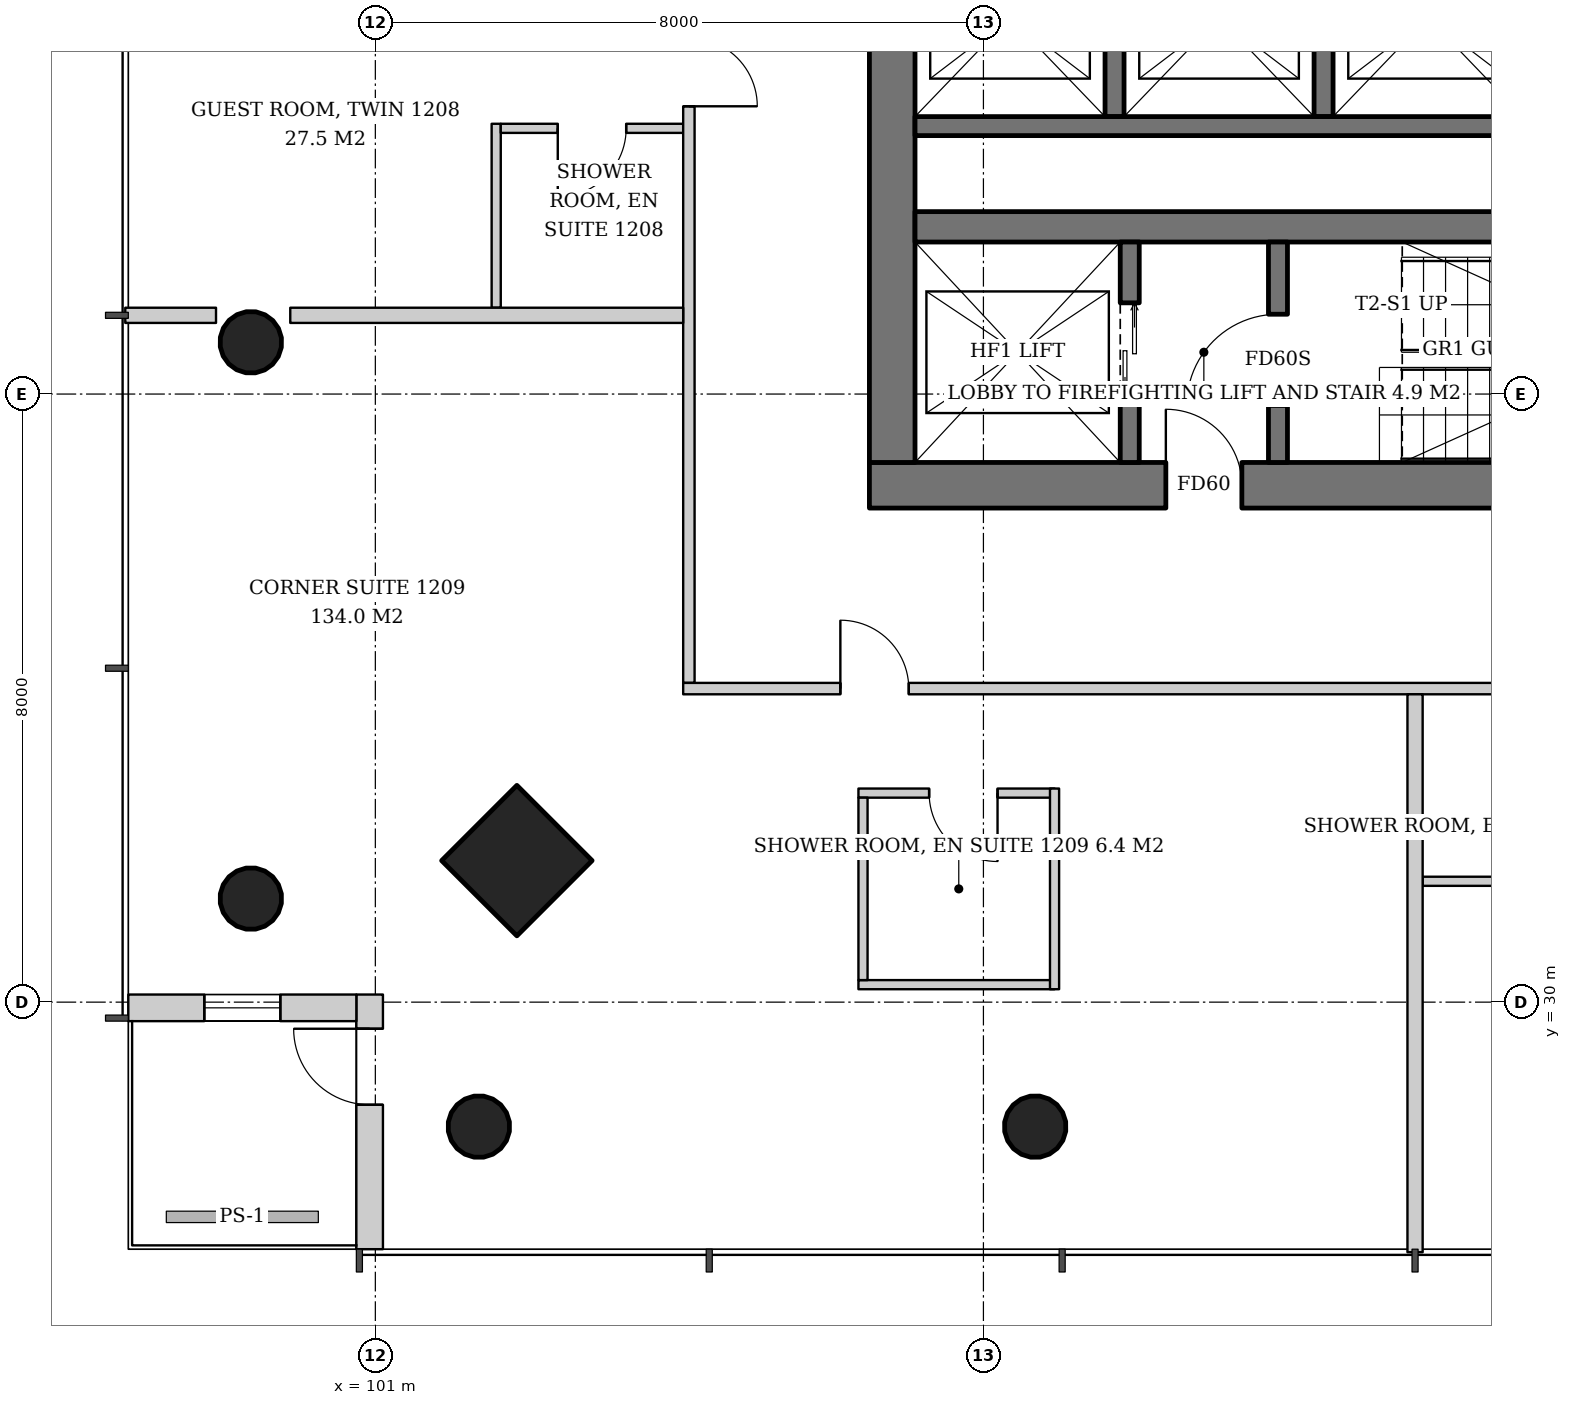
"""IFC4 building model, lengths in metres.
Left out: names, types, materials, properties, quantities, classifications, styles, units other than length and angle.
Written with IfcOpenShell. Run it as: python <this file> out.ifc"""

import sys

from ifc_helpers import new_model, si_unit, direction, frame, frame_2d, origin, origin_2d, place, context, subcontext, project, spatial, rectangle, hollow_circle, extrude, element, fill, save


model = new_model("IFC4")
c1 = context("Model", 3, precision=1e-05, world=origin(), true_north=direction((0.0, 1.0)))
c2 = subcontext(c1, "Body", "Model", "MODEL_VIEW")
j1 = project(units=[si_unit("LENGTHUNIT", "METRE"), si_unit("PLANEANGLEUNIT", "RADIAN")], contexts=[c1])
p1 = place(None, origin())
s1 = spatial("IfcSite", under=j1, at=p1, CompositionType="ELEMENT")
p2 = place(p1, origin())
s2 = spatial("IfcBuilding", under=s1, at=p2, CompositionType="ELEMENT")
p3 = place(p2, frame((0.0, 0.0, 51.4)))
s3 = spatial("IfcBuildingStorey", under=s2, at=p3, CompositionType="ELEMENT", Elevation=51.4)
p4 = place(p3, frame((102.81, 31.81, 0.0), z_axis=(0.043029647111, 0.043029647111, 0.998146732169), x_axis=(-0.707106781187, 0.707106781187, 0.0)))
e1 = element("IfcColumn", 1, at=p4, inside=s3, PredefinedType="COLUMN", context=c2, shape_type="SweptSolid", body=[
    extrude(rectangle(XDim=1.4, YDim=1.4, at=origin_2d()), origin(), (0.0, 0.0, 1.0), 3.807),
])
p5 = place(p3, frame((99.31, 31.31, 0.0), z_axis=(0.043029647111, 0.043029647111, 0.998146732169), x_axis=(-0.707106781187, 0.707106781187, 0.0)))
e2 = element("IfcColumn", 2, at=p5, inside=s3, PredefinedType="COLUMN", context=c2, shape_type="SweptSolid", body=[
    extrude(hollow_circle(Radius=0.406, WallThickness=0.03, at=origin_2d()), origin(), (0.0, 0.0, 1.0), 3.807),
])
p6 = place(p3, frame((99.31, 38.655, 0.0), z_axis=(0.043059584825, 0.021497706284, 0.998841188968), x_axis=(-0.446680166538, 0.894693706707, 0.0)))
e3 = element("IfcColumn", 3, at=p6, inside=s3, PredefinedType="COLUMN", context=c2, shape_type="SweptSolid", body=[
    extrude(hollow_circle(Radius=0.406, WallThickness=0.03, at=origin_2d()), origin(), (0.0, 0.0, 1.0), 3.804),
])
p7 = place(p3, frame((102.31, 28.31, 0.0), z_axis=(0.043029647111, 0.043029647111, 0.998146732169), x_axis=(-0.707106781187, 0.707106781187, 0.0)))
e4 = element("IfcColumn", 4, at=p7, inside=s3, PredefinedType="COLUMN", context=c2, shape_type="SweptSolid", body=[
    extrude(hollow_circle(Radius=0.406, WallThickness=0.03, at=origin_2d()), origin(), (0.0, 0.0, 1.0), 3.807),
])
p8 = place(p3, frame((109.655, 28.31, 0.0), z_axis=(0.021497706284, 0.043059584825, 0.998841188968), x_axis=(-0.894693706707, 0.446680166538, 0.0)))
e5 = element("IfcColumn", 5, at=p8, inside=s3, PredefinedType="COLUMN", context=c2, shape_type="SweptSolid", body=[
    extrude(hollow_circle(Radius=0.406, WallThickness=0.03, at=origin_2d()), origin(), (0.0, 0.0, 1.0), 3.804),
])
p9 = place(p3, frame((107.5, 36.8, 0.0), z_axis=(0.0, 0.0, 1.0), x_axis=(1.0, 0.0, 0.0)))
e6 = element("IfcWall", 6, at=p9, inside=s3, PredefinedType="SHEAR", context=c2, shape_type="SweptSolid", body=[
    extrude(rectangle(XDim=19.0, YDim=0.6, at=frame_2d((9.5, 0.0))), origin(), (0.0, 0.0, 1.0), 3.8),
])
p10 = place(p9, frame((3.9, 0.0, 0.0)))
e7 = element("IfcOpeningElement", 7, at=p10, cuts=e6, PredefinedType="OPENING", context=c2, shape_type="SweptSolid", body=[
    extrude(rectangle(XDim=1.0, YDim=2.1, at=frame_2d((0.5, 1.05))), frame((0.0, 0.31, 0.0), z_axis=(0.0, -1.0, 0.0), x_axis=(1.0, 0.0, 0.0)), (0.0, 0.0, 1.0), 0.62),
])
p11 = place(p9, frame((14.335, 0.0, 0.0)))
e8 = element("IfcOpeningElement", 8, at=p11, cuts=e6, PredefinedType="OPENING", context=c2, shape_type="SweptSolid", body=[
    extrude(rectangle(XDim=1.0, YDim=2.1, at=frame_2d((0.5, 1.05))), frame((0.0, 0.31, 0.0), z_axis=(0.0, -1.0, 0.0), x_axis=(1.0, 0.0, 0.0)), (0.0, 0.0, 1.0), 0.62),
])
p12 = place(p9, frame((16.2, 0.0, 0.0)))
e9 = element("IfcOpeningElement", 9, at=p12, cuts=e6, PredefinedType="OPENING", context=c2, shape_type="SweptSolid", body=[
    extrude(rectangle(XDim=1.0, YDim=2.1, at=frame_2d((0.5, 1.05))), frame((0.0, 0.31, 0.0), z_axis=(0.0, -1.0, 0.0), x_axis=(1.0, 0.0, 0.0)), (0.0, 0.0, 1.0), 0.62),
])
p13 = place(p3, frame((107.8, 37.1, 0.0), z_axis=(0.0, 0.0, 1.0), x_axis=(0.0, 1.0, 0.0)))
e10 = element("IfcWall", 10, at=p13, inside=s3, PredefinedType="SHEAR", context=c2, shape_type="SweptSolid", body=[
    extrude(rectangle(XDim=17.8, YDim=0.6, at=frame_2d((8.9, 0.0))), origin(), (0.0, 0.0, 1.0), 3.8),
])
p14 = place(p13, frame((8.0, 0.0, 0.0)))
e11 = element("IfcOpeningElement", 11, at=p14, cuts=e10, PredefinedType="OPENING", context=c2, shape_type="SweptSolid", body=[
    extrude(rectangle(XDim=1.8, YDim=2.4, at=frame_2d((0.9, 1.2))), frame((0.0, 0.31, 0.0), z_axis=(0.0, -1.0, 0.0), x_axis=(1.0, 0.0, 0.0)), (0.0, 0.0, 1.0), 0.62),
])
p15 = place(p3, frame((108.1, 40.2, 0.0), z_axis=(0.0, 0.0, 1.0), x_axis=(1.0, 0.0, 0.0)))
e12 = element("IfcWall", 12, at=p15, inside=s3, PredefinedType="SHEAR", context=c2, shape_type="SweptSolid", body=[
    extrude(rectangle(XDim=17.8, YDim=0.4, at=frame_2d((8.9, 0.0))), origin(), (0.0, 0.0, 1.0), 3.8),
])
p16 = place(p3, frame((100.925, 26.75, 0.0), z_axis=(0.0, 0.0, 1.0), x_axis=(0.0, 1.0, 0.0)))
e13 = element("IfcWall", 13, at=p16, inside=s3, PredefinedType="SOLIDWALL", context=c2, shape_type="SweptSolid", body=[
    extrude(rectangle(XDim=3.35, YDim=0.35, at=frame_2d((1.675, 0.0))), origin(), (0.0, 0.0, 1.0), 3.6),
])
p17 = place(p16, frame((1.9, 0.0, 0.0)))
e14 = element("IfcOpeningElement", 14, at=p17, cuts=e13, PredefinedType="OPENING", context=c2, shape_type="SweptSolid", body=[
    extrude(rectangle(XDim=1.0, YDim=2.4, at=frame_2d((0.5, 1.2))), frame((0.0, 0.185, 0.0), z_axis=(0.0, -1.0, 0.0), x_axis=(1.0, 0.0, 0.0)), (0.0, 0.0, 1.0), 0.37),
])
p18 = place(p3, frame((100.75, 29.925, 0.0), z_axis=(0.0, 0.0, 1.0), x_axis=(-1.0, 0.0, 0.0)))
e15 = element("IfcWall", 15, at=p18, inside=s3, PredefinedType="SOLIDWALL", context=c2, shape_type="SweptSolid", body=[
    extrude(rectangle(XDim=3.0, YDim=0.35, at=frame_2d((1.5, 0.0))), origin(), (0.0, 0.0, 1.0), 3.6),
])
p19 = place(p18, frame((1.0, 0.0, 0.9)))
e16 = element("IfcOpeningElement", 16, at=p19, cuts=e15, PredefinedType="OPENING", context=c2, shape_type="SweptSolid", body=[
    extrude(rectangle(XDim=1.0, YDim=2.4, at=frame_2d((0.5, 1.2))), frame((0.0, 0.185, 0.0), z_axis=(0.0, -1.0, 0.0), x_axis=(1.0, 0.0, 0.0)), (0.0, 0.0, 1.0), 0.37),
])
p20 = place(p3, frame((110.925, 37.1, 0.0), z_axis=(0.0, 0.0, 1.0), x_axis=(0.0, 1.0, 0.0)))
e17 = element("IfcWall", 17, at=p20, inside=s3, PredefinedType="SHEAR", context=c2, shape_type="SweptSolid", body=[
    extrude(rectangle(XDim=2.9, YDim=0.25, at=frame_2d((1.45, 0.0))), origin(), (0.0, 0.0, 1.0), 3.8),
])
p21 = place(p20, frame((0.8, 0.0, 0.0)))
e18 = element("IfcOpeningElement", 18, at=p21, cuts=e17, PredefinedType="OPENING", context=c2, shape_type="SweptSolid", body=[
    extrude(rectangle(XDim=1.3, YDim=2.2, at=frame_2d((0.65, 1.1))), frame((0.0, 0.135, 0.0), z_axis=(0.0, -1.0, 0.0), x_axis=(1.0, 0.0, 0.0)), (0.0, 0.0, 1.0), 0.27),
])
p22 = place(p3, frame((112.875, 37.1, 0.0), z_axis=(0.0, 0.0, 1.0), x_axis=(0.0, 1.0, 0.0)))
e19 = element("IfcWall", 19, at=p22, inside=s3, PredefinedType="SHEAR", context=c2, shape_type="SweptSolid", body=[
    extrude(rectangle(XDim=2.9, YDim=0.25, at=frame_2d((1.45, 0.0))), origin(), (0.0, 0.0, 1.0), 3.8),
])
p23 = place(p22, frame((0.75, 0.0, 0.0)))
e20 = element("IfcOpeningElement", 20, at=p23, cuts=e19, PredefinedType="OPENING", context=c2, shape_type="SweptSolid", body=[
    extrude(rectangle(XDim=1.2, YDim=2.1, at=frame_2d((0.6, 1.05))), frame((0.0, 0.135, 0.0), z_axis=(0.0, -1.0, 0.0), x_axis=(1.0, 0.0, 0.0)), (0.0, 0.0, 1.0), 0.27),
])
for number, where, z_axis, x_axis in (
    (21, (110.725, 44.25, 0.0), (0.0, 0.0, 1.0), (0.0, -1.0, 0.0)),
    (22, (113.475, 44.25, 0.0), (0.0, 0.0, 1.0), (0.0, -1.0, 0.0)),
):
    element("IfcWall", number, at=place(p3, frame(where, z_axis=z_axis, x_axis=x_axis)), inside=s3, PredefinedType="SHEAR", context=c2, shape_type="SweptSolid", body=[
        extrude(rectangle(XDim=2.6, YDim=0.25, at=frame_2d((1.3, 0.0))), origin(), (0.0, 0.0, 1.0), 3.8),
    ])
p24 = place(p3, frame((108.1, 41.525, 0.0), z_axis=(0.0, 0.0, 1.0), x_axis=(1.0, 0.0, 0.0)))
e23 = element("IfcWall", 23, at=p24, inside=s3, PredefinedType="SHEAR", context=c2, shape_type="SweptSolid", body=[
    extrude(rectangle(XDim=11.0, YDim=0.25, at=frame_2d((5.5, 0.0))), origin(), (0.0, 0.0, 1.0), 3.8),
])
p25 = place(p3, frame((102.59, 41.556, 0.0), z_axis=(0.0, 0.0, 1.0), x_axis=(0.0, -1.0, 0.0)))
e24 = element("IfcWall", 24, at=p25, inside=s3, PredefinedType="PARTITIONING", context=c2, shape_type="SweptSolid", body=[
    extrude(rectangle(XDim=2.42, YDim=0.12, at=frame_2d((1.21, 0.0))), origin(), (0.0, 0.0, 1.0), 3.6),
])
p26 = place(p3, frame((105.05, 41.496, 0.0), z_axis=(0.0, 0.0, 1.0), x_axis=(-1.0, 0.0, 0.0)))
e25 = element("IfcWall", 25, at=p26, inside=s3, PredefinedType="PARTITIONING", context=c2, shape_type="SweptSolid", body=[
    extrude(rectangle(XDim=2.4, YDim=0.12, at=frame_2d((1.2, 0.0))), origin(), (0.0, 0.0, 1.0), 3.6),
])
p27 = place(p26, frame((0.75, 0.0, 0.0)))
e26 = element("IfcOpeningElement", 26, at=p27, cuts=e25, PredefinedType="OPENING", context=c2, shape_type="SweptSolid", body=[
    extrude(rectangle(XDim=0.9, YDim=2.1, at=frame_2d((0.45, 1.05))), frame((0.0, 0.07, 0.0), z_axis=(0.0, -1.0, 0.0), x_axis=(1.0, 0.0, 0.0)), (0.0, 0.0, 1.0), 0.14),
])
p28 = place(p3, frame((105.125, 57.95, 0.0), z_axis=(0.0, 0.0, 1.0), x_axis=(0.0, -1.0, 0.0)))
e27 = element("IfcWall", 27, at=p28, inside=s3, PredefinedType="PARTITIONING", context=c2, shape_type="SweptSolid", body=[
    extrude(rectangle(XDim=23.75, YDim=0.15, at=frame_2d((11.875, 0.0))), origin(), (0.0, 0.0, 1.0), 2.8),
])
p29 = place(p28, frame((2.068, 0.0, 0.0)))
e28 = element("IfcOpeningElement", 28, at=p29, cuts=e27, PredefinedType="OPENING", context=c2, shape_type="SweptSolid", body=[
    extrude(rectangle(XDim=0.9, YDim=2.1, at=frame_2d((0.45, 1.05))), frame((0.0, 0.085, 0.0), z_axis=(0.0, -1.0, 0.0), x_axis=(1.0, 0.0, 0.0)), (0.0, 0.0, 1.0), 0.17),
])
p30 = place(p28, frame((7.686, 0.0, 0.0)))
e29 = element("IfcOpeningElement", 29, at=p30, cuts=e27, PredefinedType="OPENING", context=c2, shape_type="SweptSolid", body=[
    extrude(rectangle(XDim=1.0, YDim=2.1, at=frame_2d((0.5, 1.05))), frame((0.0, 0.085, 0.0), z_axis=(0.0, -1.0, 0.0), x_axis=(1.0, 0.0, 0.0)), (0.0, 0.0, 1.0), 0.17),
])
p31 = place(p28, frame((12.379, 0.0, 0.0)))
e30 = element("IfcOpeningElement", 30, at=p31, cuts=e27, PredefinedType="OPENING", context=c2, shape_type="SweptSolid", body=[
    extrude(rectangle(XDim=0.9, YDim=2.1, at=frame_2d((0.45, 1.05))), frame((0.0, 0.085, 0.0), z_axis=(0.0, -1.0, 0.0), x_axis=(1.0, 0.0, 0.0)), (0.0, 0.0, 1.0), 0.17),
])
p32 = place(p28, frame((15.264, 0.0, 0.0)))
e31 = element("IfcOpeningElement", 31, at=p32, cuts=e27, PredefinedType="OPENING", context=c2, shape_type="SweptSolid", body=[
    extrude(rectangle(XDim=0.9, YDim=2.1, at=frame_2d((0.45, 1.05))), frame((0.0, 0.085, 0.0), z_axis=(0.0, -1.0, 0.0), x_axis=(1.0, 0.0, 0.0)), (0.0, 0.0, 1.0), 0.17),
])
p33 = place(p3, frame((105.05, 39.036, 0.0), z_axis=(0.0, 0.0, 1.0), x_axis=(-1.0, 0.0, 0.0)))
e32 = element("IfcWall", 32, at=p33, inside=s3, PredefinedType="PARTITIONING", context=c2, shape_type="SweptSolid", body=[
    extrude(rectangle(XDim=5.169, YDim=0.2, at=frame_2d((2.585, 0.0))), origin(), (0.0, 0.0, 1.0), 3.6),
])
p34 = place(p3, frame((98.904, 39.036, 0.0), z_axis=(0.0, 0.0, 1.0), x_axis=(-1.0, 0.0, 0.0)))
e33 = element("IfcWall", 33, at=p34, inside=s3, PredefinedType="PARTITIONING", context=c2, shape_type="SweptSolid", body=[
    extrude(rectangle(XDim=1.194, YDim=0.2, at=frame_2d((0.597, 0.0))), origin(), (0.0, 0.0, 1.0), 3.6),
])
p35 = place(p3, frame((109.936, 32.75, 0.0), z_axis=(0.0, 0.0, 1.0), x_axis=(-1.0, 0.0, 0.0)))
e34 = element("IfcWall", 34, at=p35, inside=s3, PredefinedType="PARTITIONING", context=c2, shape_type="SweptSolid", body=[
    extrude(rectangle(XDim=2.58, YDim=0.12, at=frame_2d((1.29, 0.0))), origin(), (0.0, 0.0, 1.0), 2.8),
])
p36 = place(p35, frame((0.75, 0.0, 0.0)))
e35 = element("IfcOpeningElement", 35, at=p36, cuts=e34, PredefinedType="OPENING", context=c2, shape_type="SweptSolid", body=[
    extrude(rectangle(XDim=0.9, YDim=2.1, at=frame_2d((0.45, 1.05))), frame((0.0, 0.07, 0.0), z_axis=(0.0, -1.0, 0.0), x_axis=(1.0, 0.0, 0.0)), (0.0, 0.0, 1.0), 0.14),
])
p37 = place(p3, frame((109.936, 30.23, 0.0), z_axis=(0.0, 0.0, 1.0), x_axis=(-1.0, 0.0, 0.0)))
e36 = element("IfcWall", 36, at=p37, inside=s3, PredefinedType="PARTITIONING", context=c2, shape_type="SweptSolid", body=[
    extrude(rectangle(XDim=2.58, YDim=0.12, at=frame_2d((1.29, 0.0))), origin(), (0.0, 0.0, 1.0), 2.8),
])
p38 = place(p3, frame((107.416, 32.69, 0.0), z_axis=(0.0, 0.0, 1.0), x_axis=(0.0, -1.0, 0.0)))
e37 = element("IfcWall", 37, at=p38, inside=s3, PredefinedType="PARTITIONING", context=c2, shape_type="SweptSolid", body=[
    extrude(rectangle(XDim=2.4, YDim=0.12, at=frame_2d((1.2, 0.0))), origin(), (0.0, 0.0, 1.0), 3.6),
])
p39 = place(p3, frame((109.936, 32.81, 0.0), z_axis=(0.0, 0.0, 1.0), x_axis=(0.0, -1.0, 0.0)))
e38 = element("IfcWall", 38, at=p39, inside=s3, PredefinedType="PARTITIONING", context=c2, shape_type="SweptSolid", body=[
    extrude(rectangle(XDim=2.64, YDim=0.12, at=frame_2d((1.32, 0.0))), origin(), (0.0, 0.0, 1.0), 3.6),
])
p40 = place(p3, frame((114.779, 31.59, 0.0), z_axis=(0.0, 0.0, 1.0), x_axis=(1.0, 0.0, 0.0)))
e39 = element("IfcWall", 39, at=p40, inside=s3, PredefinedType="PARTITIONING", context=c2, shape_type="SweptSolid", body=[
    extrude(rectangle(XDim=2.42, YDim=0.12, at=frame_2d((1.21, 0.0))), origin(), (0.0, 0.0, 1.0), 2.847),
])
p41 = place(p3, frame((105.05, 34.125, 0.0), z_axis=(0.0, 0.0, 1.0), x_axis=(1.0, 0.0, 0.0)))
e40 = element("IfcWall", 40, at=p41, inside=s3, PredefinedType="PARTITIONING", context=c2, shape_type="SweptSolid", body=[
    extrude(rectangle(XDim=23.75, YDim=0.15, at=frame_2d((11.875, 0.0))), origin(), (0.0, 0.0, 1.0), 2.8),
])
p42 = place(p41, frame((2.068, 0.0, 0.0)))
e41 = element("IfcOpeningElement", 41, at=p42, cuts=e40, PredefinedType="OPENING", context=c2, shape_type="SweptSolid", body=[
    extrude(rectangle(XDim=0.9, YDim=2.1, at=frame_2d((0.45, 1.05))), frame((0.0, 0.085, 0.0), z_axis=(0.0, -1.0, 0.0), x_axis=(1.0, 0.0, 0.0)), (0.0, 0.0, 1.0), 0.17),
])
p43 = place(p41, frame((12.379, 0.0, 0.0)))
e42 = element("IfcOpeningElement", 42, at=p43, cuts=e40, PredefinedType="OPENING", context=c2, shape_type="SweptSolid", body=[
    extrude(rectangle(XDim=0.9, YDim=2.1, at=frame_2d((0.45, 1.05))), frame((0.0, 0.085, 0.0), z_axis=(0.0, -1.0, 0.0), x_axis=(1.0, 0.0, 0.0)), (0.0, 0.0, 1.0), 0.17),
])
p44 = place(p3, frame((114.678, 34.05, 0.0), z_axis=(0.0, 0.0, 1.0), x_axis=(0.0, -1.0, 0.0)))
e43 = element("IfcWall", 43, at=p44, inside=s3, PredefinedType="PARTITIONING", context=c2, shape_type="SweptSolid", body=[
    extrude(rectangle(XDim=7.34, YDim=0.2, at=frame_2d((3.67, 0.0))), origin(), (0.0, 0.0, 1.0), 3.05),
])
p45 = place(p17, origin())
e44 = element("IfcDoor", 44, at=p45, inside=s3, OperationType="SINGLE_SWING_RIGHT", PredefinedType="DOOR", context=c2, shape_type="SweptSolid", body=[
    extrude(rectangle(XDim=1.0, YDim=2.4, at=frame_2d((0.5, 1.2))), frame((0.0, 0.025, 0.0), z_axis=(0.0, -1.0, 0.0), x_axis=(1.0, 0.0, 0.0)), (0.0, 0.0, 1.0), 0.05),
])
fill(e14, e44)
p46 = place(p19, origin())
e45 = element("IfcWindow", 45, at=p46, inside=s3, PartitioningType="SINGLE_PANEL", PredefinedType="WINDOW", context=c2, shape_type="SweptSolid", body=[
    extrude(rectangle(XDim=1.0, YDim=2.4, at=frame_2d((0.5, 1.2))), frame((0.0, 0.03, 0.0), z_axis=(0.0, -1.0, 0.0), x_axis=(1.0, 0.0, 0.0)), (0.0, 0.0, 1.0), 0.06),
])
fill(e16, e45)
p47 = place(p21, origin())
e46 = element("IfcDoor", 46, at=p47, inside=s3, OperationType="DOUBLE_DOOR_SLIDING", PredefinedType="DOOR", context=c2, shape_type="SweptSolid", body=[
    extrude(rectangle(XDim=1.3, YDim=2.2, at=frame_2d((0.65, 1.1))), frame((0.0, 0.025, 0.0), z_axis=(0.0, -1.0, 0.0), x_axis=(1.0, 0.0, 0.0)), (0.0, 0.0, 1.0), 0.05),
])
fill(e18, e46)
p48 = place(p23, origin())
e47 = element("IfcDoor", 47, at=p48, inside=s3, OperationType="SINGLE_SWING_LEFT", PredefinedType="DOOR", context=c2, shape_type="SweptSolid", body=[
    extrude(rectangle(XDim=1.2, YDim=2.1, at=frame_2d((0.6, 1.05))), frame((0.0, 0.025, 0.0), z_axis=(0.0, -1.0, 0.0), x_axis=(1.0, 0.0, 0.0)), (0.0, 0.0, 1.0), 0.05),
])
fill(e20, e47)
p49 = place(p10, origin())
e48 = element("IfcDoor", 48, at=p49, inside=s3, OperationType="SINGLE_SWING_LEFT", PredefinedType="DOOR", context=c2, shape_type="SweptSolid", body=[
    extrude(rectangle(XDim=1.0, YDim=2.1, at=frame_2d((0.5, 1.05))), frame((0.0, 0.025, 0.0), z_axis=(0.0, -1.0, 0.0), x_axis=(1.0, 0.0, 0.0)), (0.0, 0.0, 1.0), 0.05),
])
fill(e7, e48)
p50 = place(p27, origin())
e49 = element("IfcDoor", 49, at=p50, inside=s3, OperationType="SINGLE_SWING_RIGHT", PredefinedType="DOOR", context=c2, shape_type="SweptSolid", body=[
    extrude(rectangle(XDim=0.9, YDim=2.1, at=frame_2d((0.45, 1.05))), frame((0.0, 0.025, 0.0), z_axis=(0.0, -1.0, 0.0), x_axis=(1.0, 0.0, 0.0)), (0.0, 0.0, 1.0), 0.05),
])
fill(e26, e49)
p51 = place(p32, origin())
e50 = element("IfcDoor", 50, at=p51, inside=s3, OperationType="SINGLE_SWING_RIGHT", PredefinedType="DOOR", context=c2, shape_type="SweptSolid", body=[
    extrude(rectangle(XDim=0.9, YDim=2.1, at=frame_2d((0.45, 1.05))), frame((0.0, 0.025, 0.0), z_axis=(0.0, -1.0, 0.0), x_axis=(1.0, 0.0, 0.0)), (0.0, 0.0, 1.0), 0.05),
])
fill(e31, e50)
p52 = place(p36, origin())
e51 = element("IfcDoor", 51, at=p52, inside=s3, OperationType="SINGLE_SWING_LEFT", PredefinedType="DOOR", context=c2, shape_type="SweptSolid", body=[
    extrude(rectangle(XDim=0.9, YDim=2.1, at=frame_2d((0.45, 1.05))), frame((0.0, 0.025, 0.0), z_axis=(0.0, -1.0, 0.0), x_axis=(1.0, 0.0, 0.0)), (0.0, 0.0, 1.0), 0.05),
])
fill(e35, e51)
p53 = place(p42, origin())
e52 = element("IfcDoor", 52, at=p53, inside=s3, OperationType="SINGLE_SWING_LEFT", PredefinedType="DOOR", context=c2, shape_type="SweptSolid", body=[
    extrude(rectangle(XDim=0.9, YDim=2.1, at=frame_2d((0.45, 1.05))), frame((0.0, 0.025, 0.0), z_axis=(0.0, -1.0, 0.0), x_axis=(1.0, 0.0, 0.0)), (0.0, 0.0, 1.0), 0.05),
])
fill(e41, e52)
save(model, sys.argv[1])
